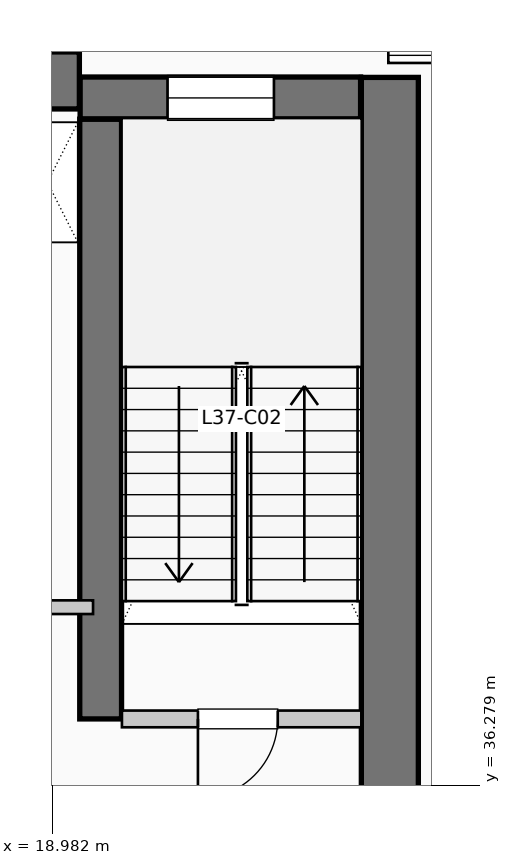
"""IFC4 building model, lengths in metres.
Left out: names, types, materials, properties, quantities, classifications, styles, units other than length and angle.
Written with IfcOpenShell. Run it as: python <this file> out.ifc"""

import sys

from ifc_helpers import new_model, si_unit, direction, frame, frame_2d, origin, place, context, subcontext, project, spatial, rectangle, extrude, element, fill, save


model = new_model("IFC4")
c1 = context("Model", 3, precision=1e-05, world=origin(), true_north=direction((0.0, 1.0)))
c2 = subcontext(c1, "Body", "Model", "MODEL_VIEW")
j1 = project(units=[si_unit("LENGTHUNIT", "METRE"), si_unit("PLANEANGLEUNIT", "RADIAN")], contexts=[c1])
p1 = place(None, origin())
s1 = spatial("IfcSite", under=j1, at=p1, CompositionType="ELEMENT")
p2 = place(p1, origin())
s2 = spatial("IfcBuilding", under=s1, at=p2, CompositionType="ELEMENT")
p3 = place(p2, frame((0.0, 0.0, 154.77)))
s3 = spatial("IfcBuildingStorey", under=s2, at=p3, CompositionType="ELEMENT", Elevation=154.77)
p4 = place(p3, frame((5.36, 45.55, 0.0), z_axis=(0.0, 0.0, 1.0), x_axis=(1.0, 0.0, 0.0)))
e1 = element("IfcWall", 1, at=p4, inside=s3, PredefinedType="SHEAR", context=c2, shape_type="SweptSolid", body=[
    extrude(rectangle(XDim=13.98, YDim=0.75, at=frame_2d((6.99, 0.0))), origin(), (0.0, 0.0, 1.0), 3.96),
])
p5 = place(p3, frame((23.425, 34.95, 0.0), z_axis=(0.0, 0.0, 1.0), x_axis=(0.0, 1.0, 0.0)))
e2 = element("IfcWall", 2, at=p5, inside=s3, PredefinedType="SHEAR", context=c2, shape_type="SweptSolid", body=[
    extrude(rectangle(XDim=10.64, YDim=0.75, at=frame_2d((5.32, 0.0))), origin(), (0.0, 0.0, 1.0), 3.96),
])
p6 = place(p3, frame((19.62, 37.15, 0.0), z_axis=(0.0, 0.0, 1.0), x_axis=(0.0, 1.0, 0.0)))
e3 = element("IfcWall", 3, at=p6, inside=s3, PredefinedType="SHEAR", context=c2, shape_type="SweptSolid", body=[
    extrude(rectangle(XDim=7.89, YDim=0.55, at=frame_2d((3.945, 0.0))), origin(), (0.0, 0.0, 1.0), 3.96),
])
p7 = place(p3, frame((19.35, 45.32, 0.0), z_axis=(0.0, 0.0, 1.0), x_axis=(1.0, 0.0, 0.0)))
e4 = element("IfcWall", 4, at=p7, inside=s3, PredefinedType="SHEAR", context=c2, shape_type="SweptSolid", body=[
    extrude(rectangle(XDim=3.69, YDim=0.55, at=frame_2d((1.845, 0.0))), origin(), (0.0, 0.0, 1.0), 3.96),
])
p8 = place(p7, frame((1.15, 0.0, 1.05)))
e5 = element("IfcOpeningElement", 5, at=p8, cuts=e4, PredefinedType="OPENING", context=c2, shape_type="SweptSolid", body=[
    extrude(rectangle(XDim=1.4, YDim=1.8, at=frame_2d((0.7, 0.9))), frame((0.0, 0.285, 0.0), z_axis=(0.0, -1.0, 0.0), x_axis=(1.0, 0.0, 0.0)), (0.0, 0.0, 1.0), 0.57),
])
p9 = place(p3, frame((19.9, 37.15, 0.0), z_axis=(0.0, 0.0, 1.0), x_axis=(1.0, 0.0, 0.0)))
e6 = element("IfcWall", 6, at=p9, inside=s3, PredefinedType="PARTITIONING", context=c2, shape_type="SweptSolid", body=[
    extrude(rectangle(XDim=3.15, YDim=0.22, at=frame_2d((1.575, 0.0))), origin(), (0.0, 0.0, 1.0), 3.71),
])
p10 = place(p9, frame((2.05, 0.0, 0.0), z_axis=(0.0, 0.0, 1.0), x_axis=(-1.0, 0.0, 0.0)))
e7 = element("IfcOpeningElement", 7, at=p10, cuts=e6, PredefinedType="OPENING", context=c2, shape_type="SweptSolid", body=[
    extrude(rectangle(XDim=1.05, YDim=2.15, at=frame_2d((0.525, 1.075))), frame((0.0, 0.12, 0.0), z_axis=(0.0, -1.0, 0.0), x_axis=(1.0, 0.0, 0.0)), (0.0, 0.0, 1.0), 0.24),
])
p11 = place(p3, frame((17.68, 38.62, 0.0), z_axis=(0.0, 0.0, 1.0), x_axis=(1.0, 0.0, 0.0)))
e8 = element("IfcWall", 8, at=p11, inside=s3, PredefinedType="PARTITIONING", context=c2, shape_type="SweptSolid", body=[
    extrude(rectangle(XDim=1.84, YDim=0.18, at=frame_2d((0.92, 0.0))), origin(), (0.0, 0.0, 1.0), 3.71),
])
p12 = place(p11, frame((0.24, 0.0, 0.0)))
e9 = element("IfcOpeningElement", 9, at=p12, cuts=e8, PredefinedType="OPENING", context=c2, shape_type="SweptSolid", body=[
    extrude(rectangle(XDim=0.92, YDim=2.1, at=frame_2d((0.46, 1.05))), frame((0.0, 0.1, 0.0), z_axis=(0.0, -1.0, 0.0), x_axis=(1.0, 0.0, 0.0)), (0.0, 0.0, 1.0), 0.2),
])
p13 = place(p8, origin())
e10 = element("IfcWindow", 10, at=p13, inside=s3, PartitioningType="SINGLE_PANEL", PredefinedType="WINDOW", context=c2, shape_type="SweptSolid", body=[
    extrude(rectangle(XDim=1.4, YDim=1.8, at=frame_2d((0.7, 0.9))), frame((0.0, 0.03, 0.0), z_axis=(0.0, -1.0, 0.0), x_axis=(1.0, 0.0, 0.0)), (0.0, 0.0, 1.0), 0.06),
])
fill(e5, e10)
p14 = place(p10, origin())
e11 = element("IfcDoor", 11, at=p14, inside=s3, OperationType="SINGLE_SWING_LEFT", PredefinedType="DOOR", context=c2, shape_type="SweptSolid", body=[
    extrude(rectangle(XDim=1.05, YDim=2.15, at=frame_2d((0.525, 1.075))), frame((0.0, 0.025, 0.0), z_axis=(0.0, -1.0, 0.0), x_axis=(1.0, 0.0, 0.0)), (0.0, 0.0, 1.0), 0.05),
])
fill(e7, e11)
save(model, sys.argv[1])
